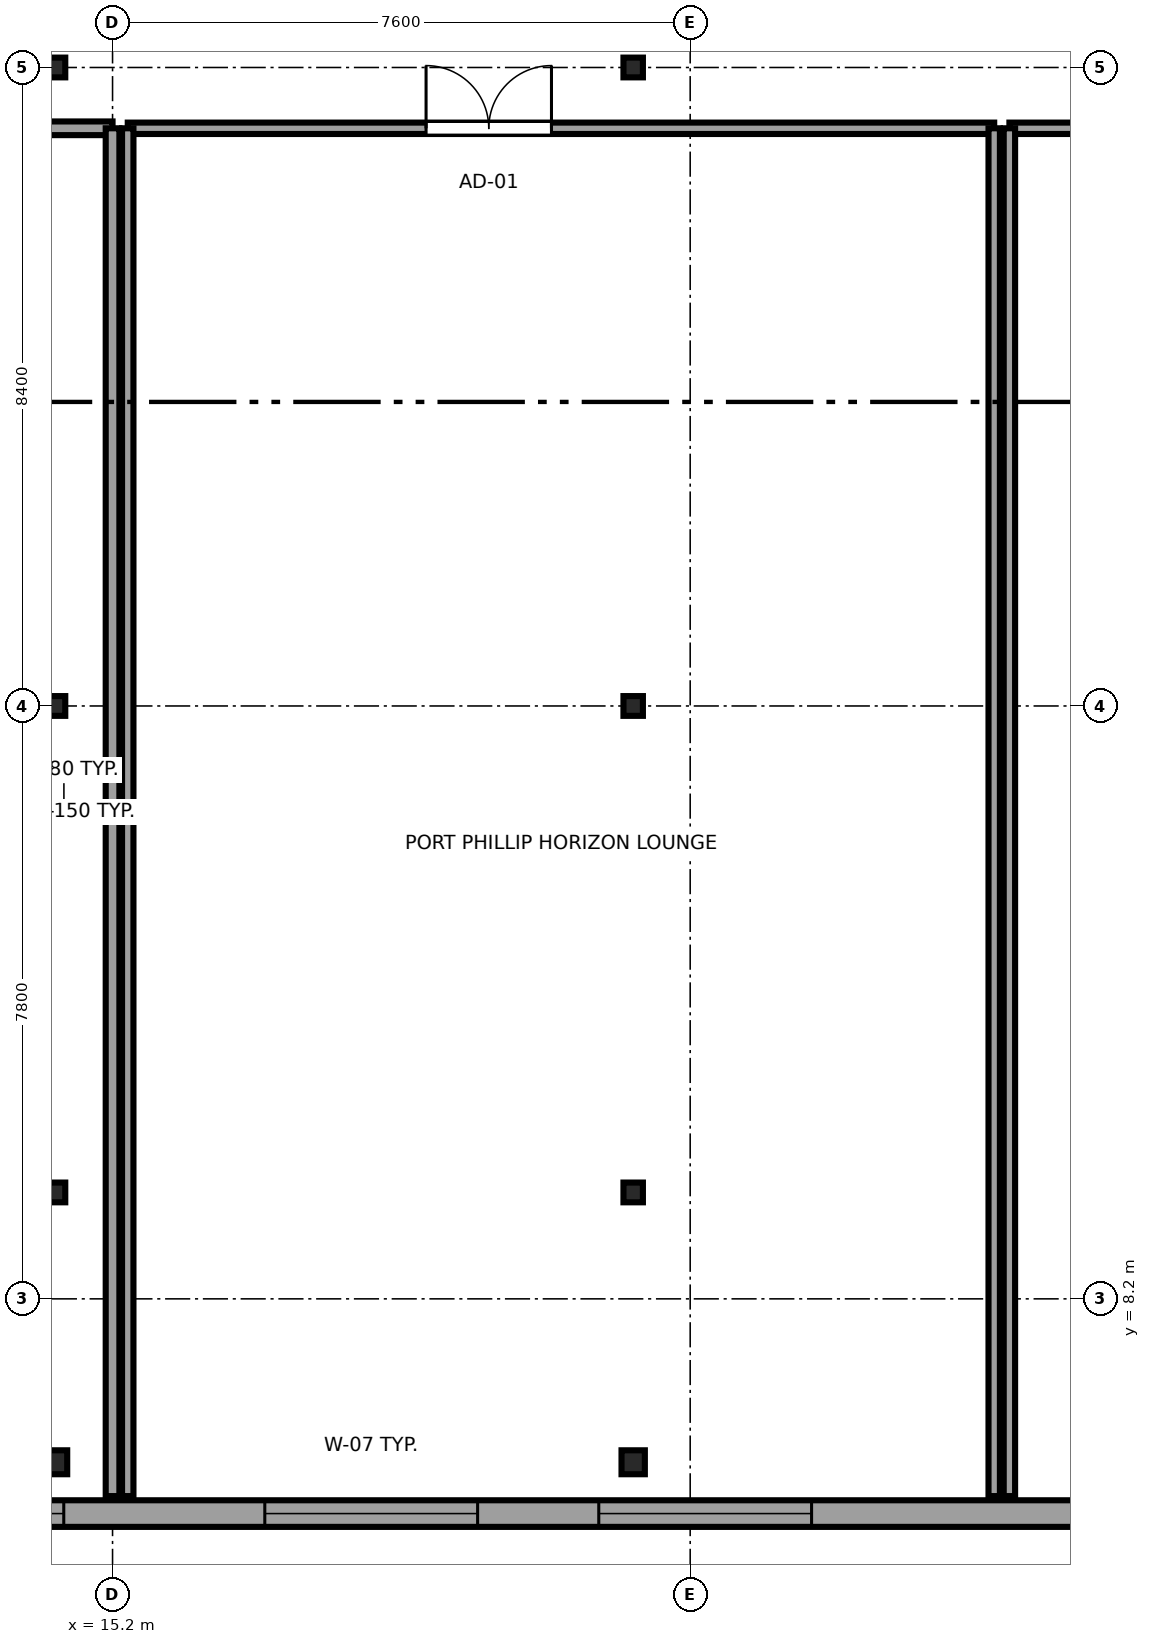
"""IFC4 building model, lengths in metres.
Left out: names, types, materials, properties, quantities, classifications, styles, units other than length and angle.
Written with IfcOpenShell. Run it as: python <this file> out.ifc"""

import sys

from ifc_helpers import new_model, si_unit, direction, frame, frame_2d, origin, origin_2d, place, context, subcontext, project, spatial, rectangle, i_section, extrude, source, transform, mapped, element, fill, save


model = new_model("IFC4")
c1 = context("Model", 3, precision=1e-05, world=origin(), true_north=direction((0.0, 1.0)))
c2 = subcontext(c1, "Body", "Model", "MODEL_VIEW")
j1 = project(units=[si_unit("LENGTHUNIT", "METRE"), si_unit("PLANEANGLEUNIT", "RADIAN")], contexts=[c1])
p1 = place(None, origin())
s1 = spatial("IfcSite", under=j1, at=p1, CompositionType="ELEMENT")
p2 = place(p1, origin())
s2 = spatial("IfcBuilding", under=s1, at=p2, CompositionType="ELEMENT")
p3 = place(p2, frame((0.0, 0.0, 282.15)))
s3 = spatial("IfcBuildingStorey", under=s2, at=p3, CompositionType="ELEMENT", Elevation=282.15)
m1 = source(origin(), c2, "Body", "SweptSolid", [
    extrude(i_section(OverallWidth=0.307, OverallDepth=0.315, WebThickness=0.012, FlangeThickness=0.019, FilletRadius=0.017, at=origin_2d()), origin(), (0.0, 0.0, 1.0), 4.4),
])
p4 = place(p3, frame((14.45, 6.05, 0.0), z_axis=(0.0, 0.0, 1.0), x_axis=(1.0, 0.0, 0.0)))
e1 = element("IfcColumn", 1, at=p4, inside=s3, PredefinedType="COLUMN", context=c2, shape_type="MappedRepresentation", body=[
    mapped(m1, transform((0.0, 0.0, 0.0), x_axis=(1.0, 0.0, 0.0), y_axis=(0.0, 1.0, 0.0), z_axis=(0.0, 0.0, 1.0), scale=1.0)),
])
m2 = source(origin(), c2, "Body", "SweptSolid", [
    extrude(i_section(OverallWidth=0.256, OverallDepth=0.26, WebThickness=0.01, FlangeThickness=0.017, FilletRadius=0.014, at=origin_2d()), origin(), (0.0, 0.0, 1.0), 4.4),
])
for number, where, z_axis, x_axis in (
    (2, (14.45, 9.6, 0.0), (0.0, 0.0, 1.0), (1.0, 0.0, 0.0)),
    (3, (14.45, 16.0, 0.0), (0.0, 0.0, 1.0), (1.0, 0.0, 0.0)),
    (4, (14.45, 24.4, 0.0), (0.0, 0.0, 1.0), (1.0, 0.0, 0.0)),
):
    element("IfcColumn", number, at=place(p3, frame(where, z_axis=z_axis, x_axis=x_axis)), inside=s3, PredefinedType="COLUMN", context=c2, shape_type="MappedRepresentation", body=[
        mapped(m2, transform((0.0, 0.0, 0.0), x_axis=(1.0, 0.0, 0.0), y_axis=(0.0, 1.0, 0.0), z_axis=(0.0, 0.0, 1.0), scale=1.0)),
    ])
p5 = place(p3, frame((22.05, 6.05, 0.0), z_axis=(0.0, 0.0, 1.0), x_axis=(1.0, 0.0, 0.0)))
e5 = element("IfcColumn", 5, at=p5, inside=s3, PredefinedType="COLUMN", context=c2, shape_type="MappedRepresentation", body=[
    mapped(m1, transform((0.0, 0.0, 0.0), x_axis=(1.0, 0.0, 0.0), y_axis=(0.0, 1.0, 0.0), z_axis=(0.0, 0.0, 1.0), scale=1.0)),
])
for number, where, z_axis, x_axis in (
    (6, (22.05, 9.6, 0.0), (0.0, 0.0, 1.0), (1.0, 0.0, 0.0)),
    (7, (22.05, 16.0, 0.0), (0.0, 0.0, 1.0), (1.0, 0.0, 0.0)),
    (8, (22.05, 24.4, 0.0), (0.0, 0.0, 1.0), (1.0, 0.0, 0.0)),
):
    element("IfcColumn", number, at=place(p3, frame(where, z_axis=z_axis, x_axis=x_axis)), inside=s3, PredefinedType="COLUMN", context=c2, shape_type="MappedRepresentation", body=[
        mapped(m2, transform((0.0, 0.0, 0.0), x_axis=(1.0, 0.0, 0.0), y_axis=(0.0, 1.0, 0.0), z_axis=(0.0, 0.0, 1.0), scale=1.0)),
    ])
p6 = place(p3, frame((7.017, 5.375, 0.0), z_axis=(0.0, 0.0, 1.0), x_axis=(1.0, 0.0, 0.0)))
e9 = element("IfcWall", 9, at=p6, inside=s3, PredefinedType="SOLIDWALL", context=c2, shape_type="SweptSolid", body=[
    extrude(rectangle(XDim=27.566, YDim=0.35, at=frame_2d((13.783, 0.0))), origin(), (0.0, 0.0, 1.0), 4.18),
])
p7 = place(p6, frame((1.397, 0.0, 0.62)))
e10 = element("IfcOpeningElement", 10, at=p7, cuts=e9, PredefinedType="OPENING", context=c2, shape_type="SweptSolid", body=[
    extrude(rectangle(XDim=2.8, YDim=2.25, at=frame_2d((1.4, 1.125))), frame((0.0, 0.185, 0.0), z_axis=(0.0, -1.0, 0.0), x_axis=(1.0, 0.0, 0.0)), (0.0, 0.0, 1.0), 0.37),
])
p8 = place(p6, frame((4.741, 0.0, 0.62)))
e11 = element("IfcOpeningElement", 11, at=p8, cuts=e9, PredefinedType="OPENING", context=c2, shape_type="SweptSolid", body=[
    extrude(rectangle(XDim=2.8, YDim=2.25, at=frame_2d((1.4, 1.125))), frame((0.0, 0.185, 0.0), z_axis=(0.0, -1.0, 0.0), x_axis=(1.0, 0.0, 0.0)), (0.0, 0.0, 1.0), 0.37),
])
p9 = place(p6, frame((10.186, 0.0, 0.62)))
e12 = element("IfcOpeningElement", 12, at=p9, cuts=e9, PredefinedType="OPENING", context=c2, shape_type="SweptSolid", body=[
    extrude(rectangle(XDim=2.8, YDim=2.25, at=frame_2d((1.4, 1.125))), frame((0.0, 0.185, 0.0), z_axis=(0.0, -1.0, 0.0), x_axis=(1.0, 0.0, 0.0)), (0.0, 0.0, 1.0), 0.37),
])
p10 = place(p6, frame((14.58, 0.0, 0.62)))
e13 = element("IfcOpeningElement", 13, at=p10, cuts=e9, PredefinedType="OPENING", context=c2, shape_type="SweptSolid", body=[
    extrude(rectangle(XDim=2.8, YDim=2.25, at=frame_2d((1.4, 1.125))), frame((0.0, 0.185, 0.0), z_axis=(0.0, -1.0, 0.0), x_axis=(1.0, 0.0, 0.0)), (0.0, 0.0, 1.0), 0.37),
])
p11 = place(p6, frame((23.368, 0.0, 0.62)))
e14 = element("IfcOpeningElement", 14, at=p11, cuts=e9, PredefinedType="OPENING", context=c2, shape_type="SweptSolid", body=[
    extrude(rectangle(XDim=2.8, YDim=2.25, at=frame_2d((1.4, 1.125))), frame((0.0, 0.185, 0.0), z_axis=(0.0, -1.0, 0.0), x_axis=(1.0, 0.0, 0.0)), (0.0, 0.0, 1.0), 0.37),
])
p12 = place(p3, frame((3.005, 23.6, 0.0), z_axis=(0.0, 0.0, 1.0), x_axis=(1.0, 0.0, 0.0)))
e15 = element("IfcWall", 15, at=p12, inside=s3, PredefinedType="PARTITIONING", context=c2, shape_type="SweptSolid", body=[
    extrude(rectangle(XDim=12.195, YDim=0.18, at=frame_2d((6.098, 0.0))), origin(), (0.0, 0.0, 1.0), 4.18),
])
p13 = place(p12, frame((5.573, 0.0, 0.0)))
e16 = element("IfcOpeningElement", 16, at=p13, cuts=e15, PredefinedType="OPENING", context=c2, shape_type="SweptSolid", body=[
    extrude(rectangle(XDim=1.65, YDim=2.15, at=frame_2d((0.825, 1.075))), frame((0.0, 0.1, 0.0), z_axis=(0.0, -1.0, 0.0), x_axis=(1.0, 0.0, 0.0)), (0.0, 0.0, 1.0), 0.2),
])
p14 = place(p3, frame((15.2, 5.605, 0.0), z_axis=(0.0, 0.0, 1.0), x_axis=(0.0, 1.0, 0.0)))
e17 = element("IfcWall", 17, at=p14, inside=s3, PredefinedType="PARTITIONING", context=c2, shape_type="SweptSolid", body=[
    extrude(rectangle(XDim=17.995, YDim=0.18, at=frame_2d((8.998, 0.0))), origin(), (0.0, 0.0, 1.0), 4.18),
])
p15 = place(p3, frame((15.4, 23.6, 0.0), z_axis=(0.0, 0.0, 1.0), x_axis=(1.0, 0.0, 0.0)))
e18 = element("IfcWall", 18, at=p15, inside=s3, PredefinedType="PARTITIONING", context=c2, shape_type="SweptSolid", body=[
    extrude(rectangle(XDim=11.4, YDim=0.15, at=frame_2d((5.7, 0.0))), origin(), (0.0, 0.0, 1.0), 4.18),
])
p16 = place(p15, frame((3.925, 0.0, 0.0)))
e19 = element("IfcOpeningElement", 19, at=p16, cuts=e18, PredefinedType="OPENING", context=c2, shape_type="SweptSolid", body=[
    extrude(rectangle(XDim=1.65, YDim=2.15, at=frame_2d((0.825, 1.075))), frame((0.0, 0.085, 0.0), z_axis=(0.0, -1.0, 0.0), x_axis=(1.0, 0.0, 0.0)), (0.0, 0.0, 1.0), 0.17),
])
for number, where, z_axis, x_axis in (
    (20, (15.4, 5.605, 0.0), (0.0, 0.0, 1.0), (0.0, 1.0, 0.0)),
    (21, (26.8, 5.605, 0.0), (0.0, 0.0, 1.0), (0.0, 1.0, 0.0)),
):
    element("IfcWall", number, at=place(p3, frame(where, z_axis=z_axis, x_axis=x_axis)), inside=s3, PredefinedType="PARTITIONING", context=c2, shape_type="SweptSolid", body=[
        extrude(rectangle(XDim=17.995, YDim=0.15, at=frame_2d((8.998, 0.0))), origin(), (0.0, 0.0, 1.0), 4.18),
    ])
p17 = place(p3, frame((27.0, 23.6, 0.0), z_axis=(0.0, 0.0, 1.0), x_axis=(1.0, 0.0, 0.0)))
e22 = element("IfcWall", 22, at=p17, inside=s3, PredefinedType="PARTITIONING", context=c2, shape_type="SweptSolid", body=[
    extrude(rectangle(XDim=11.595, YDim=0.15, at=frame_2d((5.797, 0.0))), origin(), (0.0, 0.0, 1.0), 4.18),
])
p18 = place(p17, frame((2.573, 0.0, 0.0)))
e23 = element("IfcOpeningElement", 23, at=p18, cuts=e22, PredefinedType="OPENING", context=c2, shape_type="SweptSolid", body=[
    extrude(rectangle(XDim=1.65, YDim=2.15, at=frame_2d((0.825, 1.075))), frame((0.0, 0.085, 0.0), z_axis=(0.0, -1.0, 0.0), x_axis=(1.0, 0.0, 0.0)), (0.0, 0.0, 1.0), 0.17),
])
p19 = place(p3, frame((27.0, 5.605, 0.0), z_axis=(0.0, 0.0, 1.0), x_axis=(0.0, 1.0, 0.0)))
e24 = element("IfcWall", 24, at=p19, inside=s3, PredefinedType="PARTITIONING", context=c2, shape_type="SweptSolid", body=[
    extrude(rectangle(XDim=17.995, YDim=0.15, at=frame_2d((8.998, 0.0))), origin(), (0.0, 0.0, 1.0), 4.18),
])
m3 = source(origin(), c2, "Body", "SweptSolid", [
    extrude(rectangle(XDim=2.8, YDim=2.25, at=frame_2d((1.4, 1.125))), frame((0.0, 0.09, 0.0), z_axis=(0.0, -1.0, 0.0), x_axis=(1.0, 0.0, 0.0)), (0.0, 0.0, 1.0), 0.06),
])
p20 = place(p8, origin())
e25 = element("IfcWindow", 25, at=p20, inside=s3, PartitioningType="TRIPLE_PANEL_HORIZONTAL", PredefinedType="WINDOW", context=c2, shape_type="MappedRepresentation", body=[
    mapped(m3, transform((0.0, 0.0, 0.0), x_axis=(1.0, 0.0, 0.0), y_axis=(0.0, 1.0, 0.0), z_axis=(0.0, 0.0, 1.0), scale=1.0)),
])
fill(e11, e25)
p21 = place(p9, origin())
e26 = element("IfcWindow", 26, at=p21, inside=s3, PartitioningType="TRIPLE_PANEL_HORIZONTAL", PredefinedType="WINDOW", context=c2, shape_type="MappedRepresentation", body=[
    mapped(m3, transform((0.0, 0.0, 0.0), x_axis=(1.0, 0.0, 0.0), y_axis=(0.0, 1.0, 0.0), z_axis=(0.0, 0.0, 1.0), scale=1.0)),
])
fill(e12, e26)
p22 = place(p10, origin())
e27 = element("IfcWindow", 27, at=p22, inside=s3, PartitioningType="TRIPLE_PANEL_HORIZONTAL", PredefinedType="WINDOW", context=c2, shape_type="MappedRepresentation", body=[
    mapped(m3, transform((0.0, 0.0, 0.0), x_axis=(1.0, 0.0, 0.0), y_axis=(0.0, 1.0, 0.0), z_axis=(0.0, 0.0, 1.0), scale=1.0)),
])
fill(e13, e27)
m4 = source(origin(), c2, "Body", "SweptSolid", [
    extrude(rectangle(XDim=1.65, YDim=2.15, at=frame_2d((0.825, 1.075))), frame((0.0, 0.025, 0.0), z_axis=(0.0, -1.0, 0.0), x_axis=(1.0, 0.0, 0.0)), (0.0, 0.0, 1.0), 0.05),
])
p23 = place(p16, origin())
e28 = element("IfcDoor", 28, at=p23, inside=s3, OperationType="DOUBLE_DOOR_SINGLE_SWING", PredefinedType="DOOR", context=c2, shape_type="MappedRepresentation", body=[
    mapped(m4, transform((0.0, 0.0, 0.0), x_axis=(1.0, 0.0, 0.0), y_axis=(0.0, 1.0, 0.0), z_axis=(0.0, 0.0, 1.0), scale=1.0)),
])
fill(e19, e28)
save(model, sys.argv[1])
